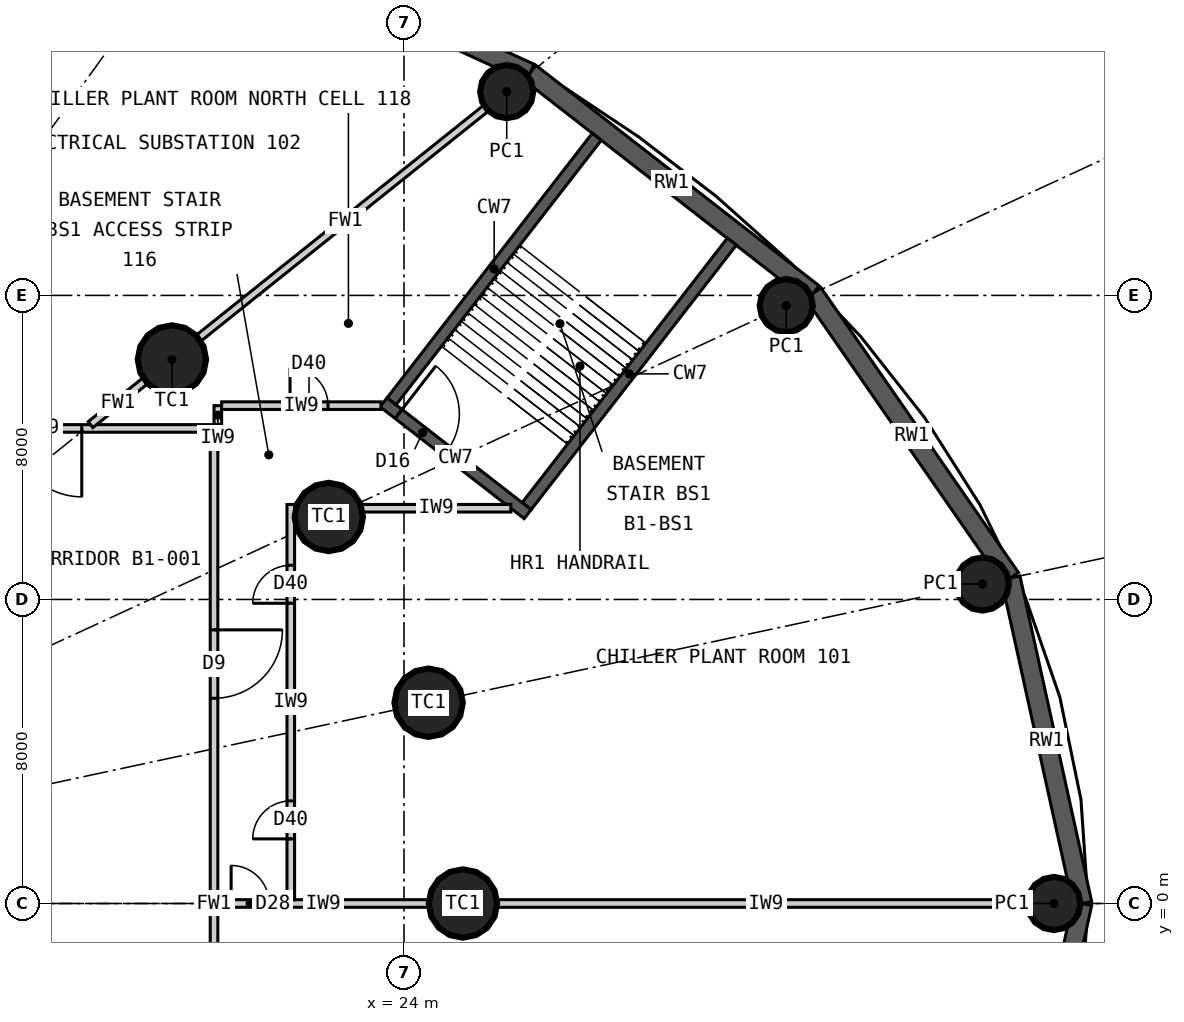
"""IFC4 building model, lengths in metres.
Left out: names, types, materials, properties, quantities, classifications, styles, units other than length and angle.
Written with IfcOpenShell. Run it as: python <this file> out.ifc"""

import sys

from ifc_helpers import new_model, si_unit, direction, frame, frame_2d, origin, origin_2d, place, context, subcontext, project, spatial, rectangle, circle, extrude, element, fill, save


model = new_model("IFC4")
c1 = context("Model", 3, precision=1e-05, world=origin(), true_north=direction((0.0, 1.0)))
c2 = subcontext(c1, "Body", "Model", "MODEL_VIEW")
j1 = project(units=[si_unit("LENGTHUNIT", "METRE"), si_unit("PLANEANGLEUNIT", "RADIAN")], contexts=[c1])
p1 = place(None, origin())
s1 = spatial("IfcSite", under=j1, at=p1, CompositionType="ELEMENT")
p2 = place(p1, origin())
s2 = spatial("IfcBuilding", under=s1, at=p2, CompositionType="ELEMENT")
p3 = place(p2, frame((0.0, 0.0, -6.0)))
s3 = spatial("IfcBuildingStorey", under=s2, at=p3, CompositionType="ELEMENT", Elevation=-6.0)
for number, where, z_axis, x_axis in (
    (1, (25.55, 0.0, 0.0), (0.0, 0.0, 1.0), (1.0, 0.0, 0.0)),
    (2, (24.647, 5.283, 0.0), (0.0, 0.0, 1.0), (1.0, 0.0, 0.0)),
    (3, (22.019, 10.17, 0.0), (0.0, 0.0, 1.0), (1.0, 0.0, 0.0)),
    (4, (17.892, 14.313, 0.0), (0.0, 0.0, 1.0), (1.0, 0.0, 0.0)),
):
    element("IfcColumn", number, at=place(p3, frame(where, z_axis=z_axis, x_axis=x_axis)), inside=s3, PredefinedType="COLUMN", context=c2, shape_type="SweptSolid", body=[
        extrude(circle(Radius=0.9, at=origin_2d()), origin(), (0.0, 0.0, 1.0), 6.0),
    ])
for number, where, z_axis, x_axis in (
    (5, (41.1, 0.0, 0.0), (0.0, 0.0, 1.0), (1.0, 0.0, 0.0)),
    (6, (39.218, 8.407, 0.0), (0.0, 0.0, 1.0), (1.0, 0.0, 0.0)),
    (7, (34.057, 15.73, 0.0), (0.0, 0.0, 1.0), (1.0, 0.0, 0.0)),
    (8, (26.702, 21.362, 0.0), (0.0, 0.0, 1.0), (1.0, 0.0, 0.0)),
):
    element("IfcColumn", number, at=place(p3, frame(where, z_axis=z_axis, x_axis=x_axis)), inside=s3, PredefinedType="COLUMN", context=c2, shape_type="SweptSolid", body=[
        extrude(circle(Radius=0.7, at=origin_2d()), origin(), (0.0, 0.0, 1.0), 6.0),
    ])
p4 = place(p3, frame((41.85, 0.0, 0.0), z_axis=(0.0, 0.0, 1.0), x_axis=(-0.215170782675, 0.976576435454, 0.0)))
e9 = element("IfcWall", 9, at=p4, inside=s3, PredefinedType="SOLIDWALL", context=c2, shape_type="SweptSolid", body=[
    extrude(rectangle(XDim=8.772, YDim=0.5, at=frame_2d((4.386, 0.0))), origin(), (0.0, 0.0, 1.0), 5.75),
])
p5 = place(p3, frame((39.963, 8.566, 0.0), z_axis=(0.0, 0.0, 1.0), x_axis=(-0.569815549616, 0.821772620264, 0.0)))
e10 = element("IfcWall", 10, at=p5, inside=s3, PredefinedType="SOLIDWALL", context=c2, shape_type="SweptSolid", body=[
    extrude(rectangle(XDim=9.117, YDim=0.5, at=frame_2d((4.559, 0.0))), origin(), (0.0, 0.0, 1.0), 5.75),
])
p6 = place(p3, frame((34.768, 16.059, 0.0), z_axis=(0.0, 0.0, 1.0), x_axis=(-0.789189230142, 0.614150111152, 0.0)))
e11 = element("IfcWall", 11, at=p6, inside=s3, PredefinedType="SOLIDWALL", context=c2, shape_type="SweptSolid", body=[
    extrude(rectangle(XDim=9.438, YDim=0.5, at=frame_2d((4.719, 0.0))), origin(), (0.0, 0.0, 1.0), 5.75),
])
p7 = place(p3, frame((27.319, 21.855, 0.0), z_axis=(0.0, 0.0, 1.0), x_axis=(-0.909171365198, 0.416422176047, 0.0)))
e12 = element("IfcWall", 12, at=p7, inside=s3, PredefinedType="SOLIDWALL", context=c2, shape_type="SweptSolid", body=[
    extrude(rectangle(XDim=9.545, YDim=0.5, at=frame_2d((4.772, 0.0))), origin(), (0.0, 0.0, 1.0), 5.75),
])
p8 = place(p3, frame((39.963, -8.566, 0.0), z_axis=(0.0, 0.0, 1.0), x_axis=(0.215170782675, 0.976576435454, 0.0)))
e13 = element("IfcWall", 13, at=p8, inside=s3, PredefinedType="SOLIDWALL", context=c2, shape_type="SweptSolid", body=[
    extrude(rectangle(XDim=8.772, YDim=0.5, at=frame_2d((4.386, 0.0))), origin(), (0.0, 0.0, 1.0), 5.75),
])
p9 = place(p3, frame((-19.1, 12.5, 0.0), z_axis=(0.0, 0.0, 1.0), x_axis=(1.0, 0.0, 0.0)))
e14 = element("IfcWall", 14, at=p9, inside=s3, PredefinedType="PARTITIONING", context=c2, shape_type="SweptSolid", body=[
    extrude(rectangle(XDim=38.2, YDim=0.2, at=frame_2d((19.1, 0.0))), origin(), (0.0, 0.0, 1.0), 5.75),
])
p10 = place(p9, frame((25.92, 0.0, 0.0)))
e15 = element("IfcOpeningElement", 15, at=p10, cuts=e14, PredefinedType="OPENING", context=c2, shape_type="SweptSolid", body=[
    extrude(rectangle(XDim=1.8, YDim=2.4, at=frame_2d((0.9, 1.2))), frame((0.0, 0.11, 0.0), z_axis=(0.0, -1.0, 0.0), x_axis=(1.0, 0.0, 0.0)), (0.0, 0.0, 1.0), 0.22),
])
p11 = place(p9, frame((20.31, 0.0, 0.0)))
e16 = element("IfcOpeningElement", 16, at=p11, cuts=e14, PredefinedType="OPENING", context=c2, shape_type="SweptSolid", body=[
    extrude(rectangle(XDim=1.8, YDim=2.4, at=frame_2d((0.9, 1.2))), frame((0.0, 0.11, 0.0), z_axis=(0.0, -1.0, 0.0), x_axis=(1.0, 0.0, 0.0)), (0.0, 0.0, 1.0), 0.22),
])
p12 = place(p9, frame((14.653, 0.0, 0.0)))
e17 = element("IfcOpeningElement", 17, at=p12, cuts=e14, PredefinedType="OPENING", context=c2, shape_type="SweptSolid", body=[
    extrude(rectangle(XDim=1.8, YDim=2.4, at=frame_2d((0.9, 1.2))), frame((0.0, 0.11, 0.0), z_axis=(0.0, -1.0, 0.0), x_axis=(1.0, 0.0, 0.0)), (0.0, 0.0, 1.0), 0.22),
])
p13 = place(p9, frame((4.103, 0.0, 0.0)))
e18 = element("IfcOpeningElement", 18, at=p13, cuts=e14, PredefinedType="OPENING", context=c2, shape_type="SweptSolid", body=[
    extrude(rectangle(XDim=1.8, YDim=2.4, at=frame_2d((0.9, 1.2))), frame((0.0, 0.11, 0.0), z_axis=(0.0, -1.0, 0.0), x_axis=(1.0, 0.0, 0.0)), (0.0, 0.0, 1.0), 0.22),
])
p14 = place(p9, frame((32.82, 0.0, 0.0)))
e19 = element("IfcOpeningElement", 19, at=p14, cuts=e14, PredefinedType="OPENING", context=c2, shape_type="SweptSolid", body=[
    extrude(rectangle(XDim=1.8, YDim=2.4, at=frame_2d((0.9, 1.2))), frame((0.0, 0.11, 0.0), z_axis=(0.0, -1.0, 0.0), x_axis=(1.0, 0.0, 0.0)), (0.0, 0.0, 1.0), 0.22),
])
p15 = place(p3, frame((19.0, -12.4, 0.0), z_axis=(0.0, 0.0, 1.0), x_axis=(0.0, 1.0, 0.0)))
e20 = element("IfcWall", 20, at=p15, inside=s3, PredefinedType="PARTITIONING", context=c2, shape_type="SweptSolid", body=[
    extrude(rectangle(XDim=24.8, YDim=0.2, at=frame_2d((12.4, 0.0))), origin(), (0.0, 0.0, 1.0), 5.75),
])
p16 = place(p15, frame((17.8, 0.0, 0.0)))
e21 = element("IfcOpeningElement", 21, at=p16, cuts=e20, PredefinedType="OPENING", context=c2, shape_type="SweptSolid", body=[
    extrude(rectangle(XDim=1.8, YDim=2.4, at=frame_2d((0.9, 1.2))), frame((0.0, 0.11, 0.0), z_axis=(0.0, -1.0, 0.0), x_axis=(1.0, 0.0, 0.0)), (0.0, 0.0, 1.0), 0.22),
])
p17 = place(p15, frame((5.2, 0.0, 0.0)))
e22 = element("IfcOpeningElement", 22, at=p17, cuts=e20, PredefinedType="OPENING", context=c2, shape_type="SweptSolid", body=[
    extrude(rectangle(XDim=1.8, YDim=2.4, at=frame_2d((0.9, 1.2))), frame((0.0, 0.11, 0.0), z_axis=(0.0, -1.0, 0.0), x_axis=(1.0, 0.0, 0.0)), (0.0, 0.0, 1.0), 0.22),
])
p18 = place(p3, frame((19.1, 0.0, 0.0), z_axis=(0.0, 0.0, 1.0), x_axis=(1.0, 0.0, 0.0)))
e23 = element("IfcWall", 23, at=p18, inside=s3, PredefinedType="PARTITIONING", context=c2, shape_type="SweptSolid", body=[
    extrude(rectangle(XDim=5.55, YDim=0.2, at=frame_2d((2.775, 0.0))), origin(), (0.0, 0.0, 1.0), 4.85),
])
p19 = place(p18, frame((0.35, 0.0, 0.0)))
e24 = element("IfcOpeningElement", 24, at=p19, cuts=e23, PredefinedType="OPENING", context=c2, shape_type="SweptSolid", body=[
    extrude(rectangle(XDim=1.0, YDim=2.2, at=frame_2d((0.5, 1.1))), frame((0.0, 0.11, 0.0), z_axis=(0.0, -1.0, 0.0), x_axis=(1.0, 0.0, 0.0)), (0.0, 0.0, 1.0), 0.22),
])
p20 = place(p3, frame((26.45, 0.0, 0.0), z_axis=(0.0, 0.0, 1.0), x_axis=(1.0, 0.0, 0.0)))
e25 = element("IfcWall", 25, at=p20, inside=s3, PredefinedType="PARTITIONING", context=c2, shape_type="SweptSolid", body=[
    extrude(rectangle(XDim=14.15, YDim=0.2, at=frame_2d((7.075, 0.0))), origin(), (0.0, 0.0, 1.0), 4.85),
])
p21 = place(p3, frame((15.75, 12.6, 0.0), z_axis=(0.0, 0.0, 1.0), x_axis=(0.780881734892, 0.6246788904, 0.0)))
e26 = element("IfcWall", 26, at=p21, inside=s3, PredefinedType="PARTITIONING", context=c2, shape_type="SweptSolid", body=[
    extrude(rectangle(XDim=1.843, YDim=0.2, at=frame_2d((0.921, 0.0))), origin(), (0.0, 0.0, 1.0), 4.9),
])
p22 = place(p3, frame((18.594, 14.875, 0.0), z_axis=(0.0, 0.0, 1.0), x_axis=(0.780868809443, 0.624695047554, 0.0)))
e27 = element("IfcWall", 27, at=p22, inside=s3, PredefinedType="PARTITIONING", context=c2, shape_type="SweptSolid", body=[
    extrude(rectangle(XDim=9.883, YDim=0.2, at=frame_2d((4.941, 0.0))), origin(), (0.0, 0.0, 1.0), 4.85),
])
p23 = place(p3, frame((27.227, 10.456, 0.0), z_axis=(0.0, 0.0, 1.0), x_axis=(0.612955943248, 0.790117087296, 0.0)))
e28 = element("IfcWall", 28, at=p23, inside=s3, PredefinedType="SHEAR", context=c2, shape_type="SweptSolid", body=[
    extrude(rectangle(XDim=8.81, YDim=0.3, at=frame_2d((4.405, 0.0))), origin(), (0.0, 0.0, 1.0), 5.75),
])
p24 = place(p3, frame((29.072, 20.175, 0.0), z_axis=(0.0, 0.0, 1.0), x_axis=(-0.612938642784, -0.790130508322, 0.0)))
e29 = element("IfcWall", 29, at=p24, inside=s3, PredefinedType="SHEAR", context=c2, shape_type="SweptSolid", body=[
    extrude(rectangle(XDim=8.81, YDim=0.3, at=frame_2d((4.405, 0.0))), origin(), (0.0, 0.0, 1.0), 5.75),
])
p25 = place(p3, frame((23.461, 13.187, 0.0), z_axis=(0.0, 0.0, 1.0), x_axis=(0.790115734311, -0.612957687279, 0.0)))
e30 = element("IfcWall", 30, at=p25, inside=s3, PredefinedType="SHEAR", context=c2, shape_type="SweptSolid", body=[
    extrude(rectangle(XDim=4.8, YDim=0.3, at=frame_2d((2.4, 0.0))), origin(), (0.0, 0.0, 1.0), 5.75),
])
p26 = place(p25, frame((0.5, 0.0, 0.0)))
e31 = element("IfcOpeningElement", 31, at=p26, cuts=e30, PredefinedType="OPENING", context=c2, shape_type="SweptSolid", body=[
    extrude(rectangle(XDim=1.6, YDim=2.1, at=frame_2d((0.8, 1.05))), frame((0.0, 0.16, 0.0), z_axis=(0.0, -1.0, 0.0), x_axis=(1.0, 0.0, 0.0)), (0.0, 0.0, 1.0), 0.32),
])
p27 = place(p3, frame((19.1, 13.1, 0.0), z_axis=(0.0, 0.0, 1.0), x_axis=(0.0, -1.0, 0.0)))
e32 = element("IfcWall", 32, at=p27, inside=s3, PredefinedType="PARTITIONING", context=c2, shape_type="SweptSolid", body=[
    extrude(rectangle(XDim=0.5, YDim=0.2, at=frame_2d((0.25, 0.0))), origin(), (0.0, 0.0, 1.0), 5.75),
])
p28 = place(p3, frame((21.02, 0.1, 0.0), z_axis=(0.0, 0.0, 1.0), x_axis=(0.0, 1.0, 0.0)))
e33 = element("IfcWall", 33, at=p28, inside=s3, PredefinedType="PARTITIONING", context=c2, shape_type="SweptSolid", body=[
    extrude(rectangle(XDim=10.4, YDim=0.2, at=frame_2d((5.2, 0.0))), origin(), (0.0, 0.0, 1.0), 5.75),
])
p29 = place(p28, frame((1.6, 0.0, 0.0)))
e34 = element("IfcOpeningElement", 34, at=p29, cuts=e33, PredefinedType="OPENING", context=c2, shape_type="SweptSolid", body=[
    extrude(rectangle(XDim=1.0, YDim=2.2, at=frame_2d((0.5, 1.1))), frame((0.0, 0.11, 0.0), z_axis=(0.0, -1.0, 0.0), x_axis=(1.0, 0.0, 0.0)), (0.0, 0.0, 1.0), 0.22),
])
p30 = place(p28, frame((7.8, 0.0, 0.0)))
e35 = element("IfcOpeningElement", 35, at=p30, cuts=e33, PredefinedType="OPENING", context=c2, shape_type="SweptSolid", body=[
    extrude(rectangle(XDim=1.0, YDim=2.2, at=frame_2d((0.5, 1.1))), frame((0.0, 0.11, 0.0), z_axis=(0.0, -1.0, 0.0), x_axis=(1.0, 0.0, 0.0)), (0.0, 0.0, 1.0), 0.22),
])
p31 = place(p3, frame((22.889, 10.4, 0.0), z_axis=(0.0, 0.0, 1.0), x_axis=(1.0, 0.0, 0.0)))
e36 = element("IfcWall", 36, at=p31, inside=s3, PredefinedType="PARTITIONING", context=c2, shape_type="SweptSolid", body=[
    extrude(rectangle(XDim=3.92, YDim=0.2, at=frame_2d((1.96, 0.0))), origin(), (0.0, 0.0, 1.0), 5.0),
])
p32 = place(p3, frame((23.394, 13.1, 0.0), z_axis=(0.0, 0.0, 1.0), x_axis=(-1.0, 0.0, 0.0)))
e37 = element("IfcWall", 37, at=p32, inside=s3, PredefinedType="PARTITIONING", context=c2, shape_type="SweptSolid", body=[
    extrude(rectangle(XDim=4.194, YDim=0.2, at=frame_2d((2.097, 0.0))), origin(), (0.0, 0.0, 1.0), 5.75),
])
p33 = place(p32, frame((1.394, 0.0, 0.0)))
e38 = element("IfcOpeningElement", 38, at=p33, cuts=e37, PredefinedType="OPENING", context=c2, shape_type="SweptSolid", body=[
    extrude(rectangle(XDim=1.0, YDim=2.2, at=frame_2d((0.5, 1.1))), frame((0.0, 0.11, 0.0), z_axis=(0.0, -1.0, 0.0), x_axis=(1.0, 0.0, 0.0)), (0.0, 0.0, 1.0), 0.22),
])
p34 = place(p26, origin())
e39 = element("IfcDoor", 39, at=p34, inside=s3, OperationType="SINGLE_SWING_LEFT", PredefinedType="DOOR", context=c2, shape_type="SweptSolid", body=[
    extrude(rectangle(XDim=1.6, YDim=2.1, at=frame_2d((0.8, 1.05))), frame((0.0, 0.025, 0.0), z_axis=(0.0, -1.0, 0.0), x_axis=(1.0, 0.0, 0.0)), (0.0, 0.0, 1.0), 0.05),
])
fill(e31, e39)
p35 = place(p16, origin())
e40 = element("IfcDoor", 40, at=p35, inside=s3, OperationType="DOUBLE_DOOR_DOUBLE_SWING", PredefinedType="DOOR", context=c2, shape_type="SweptSolid", body=[
    extrude(rectangle(XDim=1.8, YDim=2.4, at=frame_2d((0.9, 1.2))), frame((0.0, 0.025, 0.0), z_axis=(0.0, -1.0, 0.0), x_axis=(1.0, 0.0, 0.0)), (0.0, 0.0, 1.0), 0.05),
])
fill(e21, e40)
p36 = place(p19, origin())
e41 = element("IfcDoor", 41, at=p36, inside=s3, OperationType="SINGLE_SWING_LEFT", PredefinedType="DOOR", context=c2, shape_type="SweptSolid", body=[
    extrude(rectangle(XDim=1.0, YDim=2.2, at=frame_2d((0.5, 1.1))), frame((0.0, 0.025, 0.0), z_axis=(0.0, -1.0, 0.0), x_axis=(1.0, 0.0, 0.0)), (0.0, 0.0, 1.0), 0.05),
])
fill(e24, e41)
p37 = place(p29, origin())
e42 = element("IfcDoor", 42, at=p37, inside=s3, OperationType="SINGLE_SWING_LEFT", PredefinedType="DOOR", context=c2, shape_type="SweptSolid", body=[
    extrude(rectangle(XDim=1.0, YDim=2.2, at=frame_2d((0.5, 1.1))), frame((0.0, 0.025, 0.0), z_axis=(0.0, -1.0, 0.0), x_axis=(1.0, 0.0, 0.0)), (0.0, 0.0, 1.0), 0.05),
])
fill(e34, e42)
p38 = place(p30, origin())
e43 = element("IfcDoor", 43, at=p38, inside=s3, OperationType="SINGLE_SWING_LEFT", PredefinedType="DOOR", context=c2, shape_type="SweptSolid", body=[
    extrude(rectangle(XDim=1.0, YDim=2.2, at=frame_2d((0.5, 1.1))), frame((0.0, 0.025, 0.0), z_axis=(0.0, -1.0, 0.0), x_axis=(1.0, 0.0, 0.0)), (0.0, 0.0, 1.0), 0.05),
])
fill(e35, e43)
p39 = place(p33, origin())
e44 = element("IfcDoor", 44, at=p39, inside=s3, OperationType="SINGLE_SWING_RIGHT", PredefinedType="DOOR", context=c2, shape_type="SweptSolid", body=[
    extrude(rectangle(XDim=1.0, YDim=2.2, at=frame_2d((0.5, 1.1))), frame((0.0, 0.025, 0.0), z_axis=(0.0, -1.0, 0.0), x_axis=(1.0, 0.0, 0.0)), (0.0, 0.0, 1.0), 0.05),
])
fill(e38, e44)
p40 = place(p14, origin())
e45 = element("IfcDoor", 45, at=p40, inside=s3, OperationType="DOUBLE_DOOR_DOUBLE_SWING", PredefinedType="DOOR", context=c2, shape_type="SweptSolid", body=[
    extrude(rectangle(XDim=1.8, YDim=2.4, at=frame_2d((0.9, 1.2))), frame((0.0, 0.025, 0.0), z_axis=(0.0, -1.0, 0.0), x_axis=(1.0, 0.0, 0.0)), (0.0, 0.0, 1.0), 0.05),
])
fill(e19, e45)
save(model, sys.argv[1])
